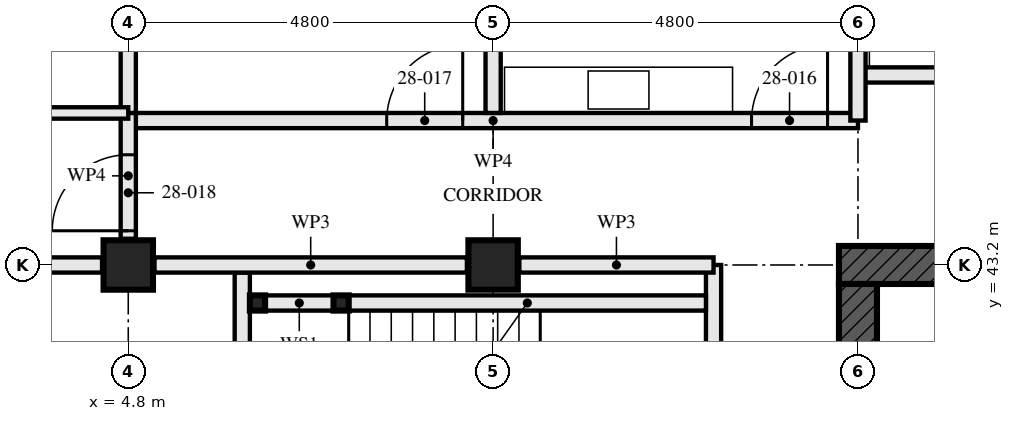
"""IFC4 building model, lengths in metres.
Left out: names, types, materials, properties, quantities, classifications, styles, units other than length and angle.
Written with IfcOpenShell. Run it as: python <this file> out.ifc"""

import sys

from ifc_helpers import new_model, si_unit, direction, frame, frame_2d, origin, origin_2d, place, context, subcontext, project, spatial, rectangle, hollow_rectangle, extrude, element, fill, save


model = new_model("IFC4")
c1 = context("Model", 3, precision=1e-05, world=origin(), true_north=direction((0.0, 1.0)))
c2 = subcontext(c1, "Body", "Model", "MODEL_VIEW")
j1 = project(units=[si_unit("LENGTHUNIT", "METRE"), si_unit("PLANEANGLEUNIT", "RADIAN")], contexts=[c1])
p1 = place(None, origin())
s1 = spatial("IfcSite", under=j1, at=p1, CompositionType="ELEMENT")
p2 = place(p1, origin())
s2 = spatial("IfcBuilding", under=s1, at=p2, CompositionType="ELEMENT")
p3 = place(p2, frame((0.0, 0.0, 105.0)))
s3 = spatial("IfcBuildingStorey", under=s2, at=p3, CompositionType="ELEMENT", Elevation=105.0)
for number, where, z_axis, x_axis in (
    (1, (4.8, 43.2, 0.0), (0.0, 0.0, 1.0), (0.0, 1.0, 0.0)),
    (2, (9.6, 43.2, 0.0), (0.0, 0.0, 1.0), (0.0, 1.0, 0.0)),
):
    element("IfcColumn", number, at=place(p3, frame(where, z_axis=z_axis, x_axis=x_axis)), inside=s3, PredefinedType="COLUMN", context=c2, shape_type="SweptSolid", body=[
        extrude(hollow_rectangle(XDim=0.65, YDim=0.65, WallThickness=0.05, at=origin_2d()), origin(), (0.0, 0.0, 1.0), 3.5),
    ])
p4 = place(p3, frame((29.05, 43.2, -0.17), z_axis=(0.0, 0.0, 1.0), x_axis=(-1.0, 0.0, 0.0)))
e3 = element("IfcWall", 3, at=p4, inside=s3, PredefinedType="SHEAR", context=c2, shape_type="SweptSolid", body=[
    extrude(rectangle(XDim=14.9, YDim=0.5, at=frame_2d((7.45, 0.0))), origin(), (0.0, 0.0, 1.0), 3.5),
])
p5 = place(p4, frame((6.85, 0.0, 0.17)))
e4 = element("IfcOpeningElement", 4, at=p5, cuts=e3, PredefinedType="OPENING", context=c2, shape_type="SweptSolid", body=[
    extrude(rectangle(XDim=1.2, YDim=2.1, at=frame_2d((0.6, 1.05))), frame((0.0, 0.26, 0.0), z_axis=(0.0, -1.0, 0.0), x_axis=(1.0, 0.0, 0.0)), (0.0, 0.0, 1.0), 0.521),
])
p6 = place(p3, frame((14.4, 42.95, -0.17), z_axis=(0.0, 0.0, 1.0), x_axis=(0.0, -1.0, 0.0)))
e5 = element("IfcWall", 5, at=p6, inside=s3, PredefinedType="SHEAR", context=c2, shape_type="SweptSolid", body=[
    extrude(rectangle(XDim=13.9, YDim=0.5, at=frame_2d((6.95, 0.0))), origin(), (0.0, 0.0, 1.0), 3.5),
])
p7 = place(p6, frame((6.35, 0.0, 0.17)))
e6 = element("IfcOpeningElement", 6, at=p7, cuts=e5, PredefinedType="OPENING", context=c2, shape_type="SweptSolid", body=[
    extrude(rectangle(XDim=1.2, YDim=2.1, at=frame_2d((0.6, 1.05))), frame((0.0, 0.26, 0.0), z_axis=(0.0, -1.0, 0.0), x_axis=(1.0, 0.0, 0.0)), (0.0, 0.0, 1.0), 0.521),
])
for number, where, z_axis, x_axis in (
    (7, (6.5, 42.7, 0.0), (0.0, 0.0, 1.0), (1.0, 0.0, 0.0)),
    (8, (7.6, 42.7, 0.0), (0.0, 0.0, 1.0), (1.0, 0.0, 0.0)),
):
    element("IfcColumn", number, at=place(p3, frame(where, z_axis=z_axis, x_axis=x_axis)), inside=s3, PredefinedType="COLUMN", context=c2, shape_type="SweptSolid", body=[
        extrude(hollow_rectangle(XDim=0.2, YDim=0.2, WallThickness=0.008, at=origin_2d()), origin(), (0.0, 0.0, 1.0), 3.33),
    ])
p8 = place(p3, frame((6.6, 42.7, 0.0), z_axis=(0.0, 0.0, 1.0), x_axis=(1.0, 0.0, 0.0)))
e9 = element("IfcWall", 9, at=p8, inside=s3, PredefinedType="SOLIDWALL", context=c2, shape_type="SweptSolid", body=[
    extrude(rectangle(XDim=0.9, YDim=0.2, at=frame_2d((0.45, 0.0))), origin(), (0.0, 0.0, 1.0), 2.99),
])
p9 = place(p3, frame((7.7, 42.7, 0.0), z_axis=(0.0, 0.0, 1.0), x_axis=(1.0, 0.0, 0.0)))
e10 = element("IfcWall", 10, at=p9, inside=s3, PredefinedType="SOLIDWALL", context=c2, shape_type="SweptSolid", body=[
    extrude(rectangle(XDim=4.7, YDim=0.2, at=frame_2d((2.35, 0.0))), origin(), (0.0, 0.0, 1.0), 2.99),
])
p10 = place(p3, frame((6.3, 43.1, 0.0), z_axis=(0.0, 0.0, 1.0), x_axis=(0.0, -1.0, 0.0)))
e11 = element("IfcWall", 11, at=p10, inside=s3, PredefinedType="SOLIDWALL", context=c2, shape_type="SweptSolid", body=[
    extrude(rectangle(XDim=3.3, YDim=0.2, at=frame_2d((1.65, 0.0))), origin(), (0.0, 0.0, 1.0), 3.33),
])
p11 = place(p3, frame((12.5, 43.2, 0.0), z_axis=(0.0, 0.0, 1.0), x_axis=(0.0, -1.0, 0.0)))
e12 = element("IfcWall", 12, at=p11, inside=s3, PredefinedType="PARTITIONING", context=c2, shape_type="SweptSolid", body=[
    extrude(rectangle(XDim=14.84, YDim=0.2, at=frame_2d((7.42, 0.0))), origin(), (0.0, 0.0, 1.0), 2.32),
])
p12 = place(p11, frame((1.4, 0.0, 0.0)))
e13 = element("IfcOpeningElement", 13, at=p12, cuts=e12, PredefinedType="OPENING", context=c2, shape_type="SweptSolid", body=[
    extrude(rectangle(XDim=1.0, YDim=2.1, at=frame_2d((0.5, 1.05))), frame((0.0, 0.111, 0.0), z_axis=(0.0, -1.0, 0.0), x_axis=(1.0, 0.0, 0.0)), (0.0, 0.0, 1.0), 0.221),
])
p13 = place(p11, frame((5.2, 0.0, 0.0)))
e14 = element("IfcOpeningElement", 14, at=p13, cuts=e12, PredefinedType="OPENING", context=c2, shape_type="SweptSolid", body=[
    extrude(rectangle(XDim=1.0, YDim=2.1, at=frame_2d((0.5, 1.05))), frame((0.0, 0.111, 0.0), z_axis=(0.0, -1.0, 0.0), x_axis=(1.0, 0.0, 0.0)), (0.0, 0.0, 1.0), 0.221),
])
p14 = place(p11, frame((13.0, 0.0, 0.0)))
e15 = element("IfcOpeningElement", 15, at=p14, cuts=e12, PredefinedType="OPENING", context=c2, shape_type="SweptSolid", body=[
    extrude(rectangle(XDim=1.0, YDim=2.1, at=frame_2d((0.5, 1.05))), frame((0.0, 0.111, 0.0), z_axis=(0.0, -1.0, 0.0), x_axis=(1.0, 0.0, 0.0)), (0.0, 0.0, 1.0), 0.221),
])
p15 = place(p3, frame((9.6, 57.353, 0.0), z_axis=(0.0, 0.0, 1.0), x_axis=(0.0, -1.0, 0.0)))
e16 = element("IfcWall", 16, at=p15, inside=s3, PredefinedType="PARTITIONING", context=c2, shape_type="SweptSolid", body=[
    extrude(rectangle(XDim=12.153, YDim=0.2, at=frame_2d((6.077, 0.0))), origin(), (0.0, 0.0, 1.0), 2.55),
])
p16 = place(p3, frame((4.8, 52.48, 0.0), z_axis=(0.0, 0.0, 1.0), x_axis=(0.0, -1.0, 0.0)))
e17 = element("IfcWall", 17, at=p16, inside=s3, PredefinedType="PARTITIONING", context=c2, shape_type="SweptSolid", body=[
    extrude(rectangle(XDim=7.28, YDim=0.2, at=frame_2d((3.64, 0.0))), origin(), (0.0, 0.0, 1.0), 2.55),
])
p17 = place(p3, frame((4.8, 45.2, 0.0), z_axis=(0.0, 0.0, 1.0), x_axis=(-1.0, 0.0, 0.0)))
e18 = element("IfcWall", 18, at=p17, inside=s3, PredefinedType="PARTITIONING", context=c2, shape_type="SweptSolid", body=[
    extrude(rectangle(XDim=2.8, YDim=0.15, at=frame_2d((1.4, 0.0))), origin(), (0.0, 0.0, 1.0), 3.33),
])
p18 = place(p3, frame((14.4, 45.1, 0.0), z_axis=(0.0, 0.0, 1.0), x_axis=(-1.0, 0.0, 0.0)))
e19 = element("IfcWall", 19, at=p18, inside=s3, PredefinedType="PARTITIONING", context=c2, shape_type="SweptSolid", body=[
    extrude(rectangle(XDim=9.6, YDim=0.2, at=frame_2d((4.8, 0.0))), origin(), (0.0, 0.0, 1.0), 3.33),
])
p19 = place(p18, frame((0.4, 0.0, 0.0)))
e20 = element("IfcOpeningElement", 20, at=p19, cuts=e19, PredefinedType="OPENING", context=c2, shape_type="SweptSolid", body=[
    extrude(rectangle(XDim=1.0, YDim=2.1, at=frame_2d((0.5, 1.05))), frame((0.0, 0.111, 0.0), z_axis=(0.0, -1.0, 0.0), x_axis=(1.0, 0.0, 0.0)), (0.0, 0.0, 1.0), 0.221),
])
p20 = place(p18, frame((5.2, 0.0, 0.0)))
e21 = element("IfcOpeningElement", 21, at=p20, cuts=e19, PredefinedType="OPENING", context=c2, shape_type="SweptSolid", body=[
    extrude(rectangle(XDim=1.0, YDim=2.1, at=frame_2d((0.5, 1.05))), frame((0.0, 0.111, 0.0), z_axis=(0.0, -1.0, 0.0), x_axis=(1.0, 0.0, 0.0)), (0.0, 0.0, 1.0), 0.221),
])
p21 = place(p3, frame((4.8, 45.2, 0.0), z_axis=(0.0, 0.0, 1.0), x_axis=(0.0, -1.0, 0.0)))
e22 = element("IfcWall", 22, at=p21, inside=s3, PredefinedType="PARTITIONING", context=c2, shape_type="SweptSolid", body=[
    extrude(rectangle(XDim=1.655, YDim=0.2, at=frame_2d((0.828, 0.0))), origin(), (0.0, 0.0, 1.0), 3.33),
])
p22 = place(p21, frame((0.55, 0.0, 0.0)))
e23 = element("IfcOpeningElement", 23, at=p22, cuts=e22, PredefinedType="OPENING", context=c2, shape_type="SweptSolid", body=[
    extrude(rectangle(XDim=1.0, YDim=2.1, at=frame_2d((0.5, 1.05))), frame((0.0, 0.111, 0.0), z_axis=(0.0, -1.0, 0.0), x_axis=(1.0, 0.0, 0.0)), (0.0, 0.0, 1.0), 0.221),
])
p23 = place(p3, frame((29.24, 45.7, 0.0), z_axis=(0.0, 0.0, 1.0), x_axis=(-1.0, 0.0, 0.0)))
e24 = element("IfcWall", 24, at=p23, inside=s3, PredefinedType="PARTITIONING", context=c2, shape_type="SweptSolid", body=[
    extrude(rectangle(XDim=14.84, YDim=0.2, at=frame_2d((7.42, 0.0))), origin(), (0.0, 0.0, 1.0), 2.32),
])
p24 = place(p23, frame((0.84, 0.0, 0.0)))
e25 = element("IfcOpeningElement", 25, at=p24, cuts=e24, PredefinedType="OPENING", context=c2, shape_type="SweptSolid", body=[
    extrude(rectangle(XDim=1.0, YDim=2.1, at=frame_2d((0.5, 1.05))), frame((0.0, 0.111, 0.0), z_axis=(0.0, -1.0, 0.0), x_axis=(1.0, 0.0, 0.0)), (0.0, 0.0, 1.0), 0.221),
])
p25 = place(p23, frame((10.44, 0.0, 0.0)))
e26 = element("IfcOpeningElement", 26, at=p25, cuts=e24, PredefinedType="OPENING", context=c2, shape_type="SweptSolid", body=[
    extrude(rectangle(XDim=1.0, YDim=2.1, at=frame_2d((0.5, 1.05))), frame((0.0, 0.111, 0.0), z_axis=(0.0, -1.0, 0.0), x_axis=(1.0, 0.0, 0.0)), (0.0, 0.0, 1.0), 0.221),
])
p26 = place(p3, frame((12.5, 43.2, 0.0), z_axis=(0.0, 0.0, 1.0), x_axis=(-1.0, 0.0, 0.0)))
e27 = element("IfcWall", 27, at=p26, inside=s3, PredefinedType="PARTITIONING", context=c2, shape_type="SweptSolid", body=[
    extrude(rectangle(XDim=2.555, YDim=0.2, at=frame_2d((1.277, 0.0))), origin(), (0.0, 0.0, 1.0), 2.32),
])
p27 = place(p3, frame((9.255, 43.2, 0.0), z_axis=(0.0, 0.0, 1.0), x_axis=(-1.0, 0.0, 0.0)))
e28 = element("IfcWall", 28, at=p27, inside=s3, PredefinedType="PARTITIONING", context=c2, shape_type="SweptSolid", body=[
    extrude(rectangle(XDim=4.11, YDim=0.2, at=frame_2d((2.055, 0.0))), origin(), (0.0, 0.0, 1.0), 2.32),
])
p28 = place(p3, frame((4.455, 43.2, 0.0), z_axis=(0.0, 0.0, 1.0), x_axis=(-1.0, 0.0, 0.0)))
e29 = element("IfcWall", 29, at=p28, inside=s3, PredefinedType="PARTITIONING", context=c2, shape_type="SweptSolid", body=[
    extrude(rectangle(XDim=4.151, YDim=0.2, at=frame_2d((2.075, 0.0))), origin(), (0.0, 0.0, 1.0), 2.32),
])
p29 = place(p3, frame((14.4, 45.1, 0.0), z_axis=(0.0, 0.0, 1.0), x_axis=(0.0, 1.0, 0.0)))
e30 = element("IfcWall", 30, at=p29, inside=s3, PredefinedType="PARTITIONING", context=c2, shape_type="SweptSolid", body=[
    extrude(rectangle(XDim=2.605, YDim=0.2, at=frame_2d((1.302, 0.0))), origin(), (0.0, 0.0, 1.0), 2.32),
])
p30 = place(p19, frame((1.0, 0.0, 0.0), z_axis=(0.0, 0.0, 1.0), x_axis=(-1.0, 0.0, 0.0)))
e31 = element("IfcDoor", 31, at=p30, inside=s3, OperationType="SINGLE_SWING_LEFT", PredefinedType="DOOR", context=c2, shape_type="SweptSolid", body=[
    extrude(rectangle(XDim=1.0, YDim=2.1, at=frame_2d((0.5, 1.05))), frame((0.0, 0.027, 0.0), z_axis=(0.0, -1.0, 0.0), x_axis=(1.0, 0.0, 0.0)), (0.0, 0.0, 1.0), 0.054),
])
fill(e20, e31)
p31 = place(p20, frame((1.0, 0.0, 0.0), z_axis=(0.0, 0.0, 1.0), x_axis=(-1.0, 0.0, 0.0)))
e32 = element("IfcDoor", 32, at=p31, inside=s3, OperationType="SINGLE_SWING_LEFT", PredefinedType="DOOR", context=c2, shape_type="SweptSolid", body=[
    extrude(rectangle(XDim=1.0, YDim=2.1, at=frame_2d((0.5, 1.05))), frame((0.0, 0.027, 0.0), z_axis=(0.0, -1.0, 0.0), x_axis=(1.0, 0.0, 0.0)), (0.0, 0.0, 1.0), 0.054),
])
fill(e21, e32)
p32 = place(p22, frame((1.0, 0.0, 0.0), z_axis=(0.0, 0.0, 1.0), x_axis=(-1.0, 0.0, 0.0)))
e33 = element("IfcDoor", 33, at=p32, inside=s3, OperationType="SINGLE_SWING_RIGHT", PredefinedType="DOOR", context=c2, shape_type="SweptSolid", body=[
    extrude(rectangle(XDim=1.0, YDim=2.1, at=frame_2d((0.5, 1.05))), frame((0.0, 0.027, 0.0), z_axis=(0.0, -1.0, 0.0), x_axis=(1.0, 0.0, 0.0)), (0.0, 0.0, 1.0), 0.054),
])
fill(e23, e33)
save(model, sys.argv[1])
